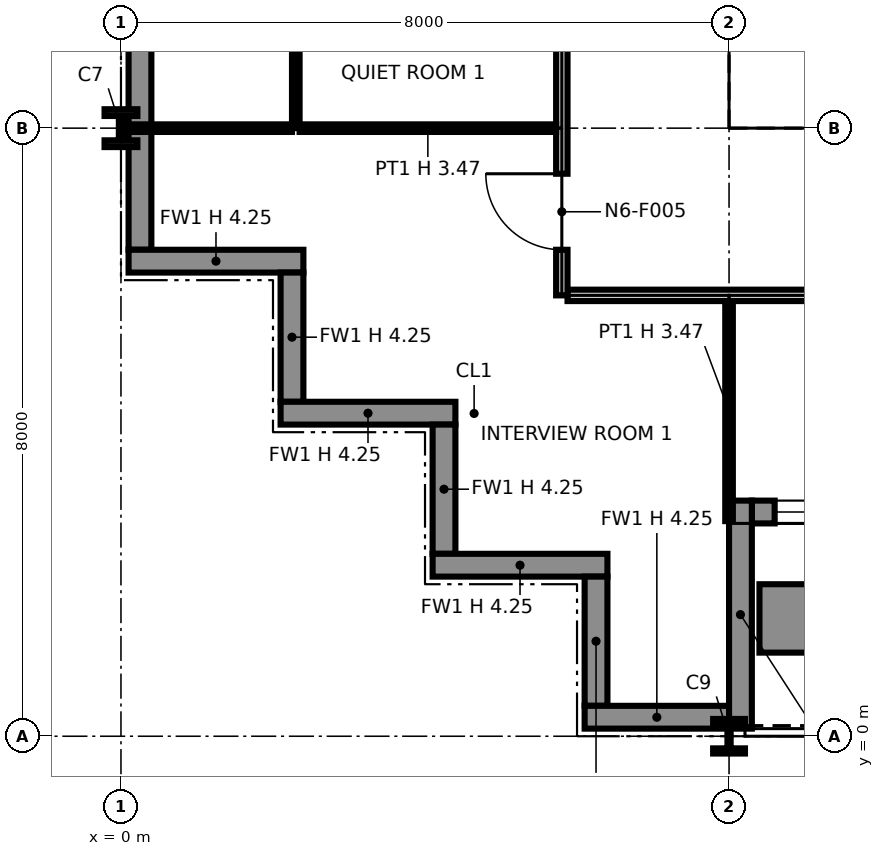
"""IFC4 building model, lengths in metres.
Left out: names, types, materials, properties, quantities, classifications, styles, units other than length and angle.
Written with IfcOpenShell. Run it as: python <this file> out.ifc"""

import sys

from ifc_helpers import new_model, si_unit, direction, frame, frame_2d, origin, origin_2d, place, context, subcontext, project, spatial, polyline, rectangle, i_section, outline, extrude, element, fill, save


model = new_model("IFC4")
c1 = context("Model", 3, precision=1e-05, world=origin(), true_north=direction((0.0, 1.0)))
c2 = subcontext(c1, "Body", "Model", "MODEL_VIEW")
j1 = project(units=[si_unit("LENGTHUNIT", "METRE"), si_unit("PLANEANGLEUNIT", "RADIAN")], contexts=[c1])
p1 = place(None, origin())
s1 = spatial("IfcSite", under=j1, at=p1, CompositionType="ELEMENT")
p2 = place(p1, origin())
s2 = spatial("IfcBuilding", under=s1, at=p2, CompositionType="ELEMENT")
p3 = place(p2, frame((0.0, 0.0, 100.8)))
s3 = spatial("IfcBuildingStorey", under=s2, at=p3, CompositionType="ELEMENT", Elevation=100.8)
p4 = place(p3, frame((0.0, 8.0, 0.0), z_axis=(0.0, 0.0, 1.0), x_axis=(1.0, 0.0, 0.0)))
e1 = element("IfcColumn", 1, at=p4, inside=s3, PredefinedType="COLUMN", context=c2, shape_type="SweptSolid", body=[
    extrude(i_section(OverallWidth=0.432, OverallDepth=0.498, WebThickness=0.056, FlangeThickness=0.089, at=origin_2d()), origin(), (0.0, 0.0, 1.0), 4.25),
])
p5 = place(p3, frame((8.0, 0.0, 0.0), z_axis=(0.0, 0.0, 1.0), x_axis=(1.0, 0.0, 0.0)))
e2 = element("IfcColumn", 2, at=p5, inside=s3, PredefinedType="COLUMN", context=c2, shape_type="SweptSolid", body=[
    extrude(i_section(OverallWidth=0.419, OverallDepth=0.455, WebThickness=0.042, FlangeThickness=0.068, at=origin_2d()), origin(), (0.0, 0.0, 1.0), 4.25),
])
p6 = place(p3, frame((8.0, 8.0, 0.0), z_axis=(0.0, 0.0, 1.0), x_axis=(1.0, 0.0, 0.0)))
e3 = element("IfcColumn", 3, at=p6, inside=s3, PredefinedType="COLUMN", context=c2, shape_type="SweptSolid", body=[
    extrude(i_section(OverallWidth=0.406, OverallDepth=0.417, WebThickness=0.03, FlangeThickness=0.048, at=origin_2d()), origin(), (0.0, 0.0, 1.0), 4.25),
])
p7 = place(p3, frame((0.25, 16.0, 0.0), z_axis=(0.0, 0.0, 1.0), x_axis=(0.0, -1.0, 0.0)))
e4 = element("IfcWall", 4, at=p7, inside=s3, PredefinedType="SOLIDWALL", context=c2, shape_type="SweptSolid", body=[
    extrude(rectangle(XDim=9.6, YDim=0.3, at=frame_2d((4.8, 0.0))), origin(), (0.0, 0.0, 1.0), 4.25),
])
p8 = place(p3, frame((0.1, 6.25, 0.0), z_axis=(0.0, 0.0, 1.0), x_axis=(1.0, 0.0, 0.0)))
e5 = element("IfcWall", 5, at=p8, inside=s3, PredefinedType="SOLIDWALL", context=c2, shape_type="SweptSolid", body=[
    extrude(rectangle(XDim=2.3, YDim=0.3, at=frame_2d((1.15, 0.0))), origin(), (0.0, 0.0, 1.0), 4.25),
])
p9 = place(p3, frame((2.25, 6.1, 0.0), z_axis=(0.0, 0.0, 1.0), x_axis=(0.0, -1.0, 0.0)))
e6 = element("IfcWall", 6, at=p9, inside=s3, PredefinedType="SOLIDWALL", context=c2, shape_type="SweptSolid", body=[
    extrude(rectangle(XDim=1.7, YDim=0.3, at=frame_2d((0.85, 0.0))), origin(), (0.0, 0.0, 1.0), 4.25),
])
p10 = place(p3, frame((2.1, 4.25, 0.0), z_axis=(0.0, 0.0, 1.0), x_axis=(1.0, 0.0, 0.0)))
e7 = element("IfcWall", 7, at=p10, inside=s3, PredefinedType="SOLIDWALL", context=c2, shape_type="SweptSolid", body=[
    extrude(rectangle(XDim=2.3, YDim=0.3, at=frame_2d((1.15, 0.0))), origin(), (0.0, 0.0, 1.0), 4.25),
])
p11 = place(p3, frame((4.25, 4.1, 0.0), z_axis=(0.0, 0.0, 1.0), x_axis=(0.0, -1.0, 0.0)))
e8 = element("IfcWall", 8, at=p11, inside=s3, PredefinedType="SOLIDWALL", context=c2, shape_type="SweptSolid", body=[
    extrude(rectangle(XDim=1.7, YDim=0.3, at=frame_2d((0.85, 0.0))), origin(), (0.0, 0.0, 1.0), 4.25),
])
p12 = place(p3, frame((4.1, 2.25, 0.0), z_axis=(0.0, 0.0, 1.0), x_axis=(1.0, 0.0, 0.0)))
e9 = element("IfcWall", 9, at=p12, inside=s3, PredefinedType="SOLIDWALL", context=c2, shape_type="SweptSolid", body=[
    extrude(rectangle(XDim=2.3, YDim=0.3, at=frame_2d((1.15, 0.0))), origin(), (0.0, 0.0, 1.0), 4.25),
])
p13 = place(p3, frame((6.25, 2.1, 0.0), z_axis=(0.0, 0.0, 1.0), x_axis=(0.0, -1.0, 0.0)))
e10 = element("IfcWall", 10, at=p13, inside=s3, PredefinedType="SOLIDWALL", context=c2, shape_type="SweptSolid", body=[
    extrude(rectangle(XDim=1.7, YDim=0.3, at=frame_2d((0.85, 0.0))), origin(), (0.0, 0.0, 1.0), 4.25),
])
p14 = place(p3, frame((6.1, 0.25, 0.0), z_axis=(0.0, 0.0, 1.0), x_axis=(1.0, 0.0, 0.0)))
e11 = element("IfcWall", 11, at=p14, inside=s3, PredefinedType="SOLIDWALL", context=c2, shape_type="SweptSolid", body=[
    extrude(rectangle(XDim=1.9, YDim=0.3, at=frame_2d((0.95, 0.0))), origin(), (0.0, 0.0, 1.0), 4.25),
])
p15 = place(p3, frame((8.3, 2.95, 0.0), z_axis=(0.0, 0.0, 1.0), x_axis=(1.0, 0.0, 0.0)))
e12 = element("IfcWall", 12, at=p15, inside=s3, PredefinedType="SOLIDWALL", context=c2, shape_type="SweptSolid", body=[
    extrude(rectangle(XDim=7.4, YDim=0.3, at=frame_2d((3.7, 0.0))), origin(), (0.0, 0.0, 1.0), 4.25),
])
p16 = place(p15, frame((0.3, 0.0, 0.9)))
e13 = element("IfcOpeningElement", 13, at=p16, cuts=e12, PredefinedType="OPENING", context=c2, shape_type="SweptSolid", body=[
    extrude(rectangle(XDim=2.8, YDim=2.2, at=frame_2d((1.4, 1.1))), frame((0.0, 0.16, 0.0), z_axis=(0.0, -1.0, 0.0), x_axis=(1.0, 0.0, 0.0)), (0.0, 0.0, 1.0), 0.32),
])
p17 = place(p15, frame((4.7, 0.0, 0.0)))
e14 = element("IfcOpeningElement", 14, at=p17, cuts=e12, PredefinedType="OPENING", context=c2, shape_type="SweptSolid", body=[
    extrude(rectangle(XDim=2.0, YDim=2.4, at=frame_2d((1.0, 1.2))), frame((0.0, 0.16, 0.0), z_axis=(0.0, -1.0, 0.0), x_axis=(1.0, 0.0, 0.0)), (0.0, 0.0, 1.0), 0.32),
])
p18 = place(p3, frame((8.15, 0.1, 0.0), z_axis=(0.0, 0.0, 1.0), x_axis=(0.0, 1.0, 0.0)))
e15 = element("IfcWall", 15, at=p18, inside=s3, PredefinedType="SOLIDWALL", context=c2, shape_type="SweptSolid", body=[
    extrude(rectangle(XDim=3.0, YDim=0.3, at=frame_2d((1.5, 0.0))), origin(), (0.0, 0.0, 1.0), 3.469),
])
p19 = place(p3, frame((8.4, 1.55, 0.0), z_axis=(0.0, 0.0, 1.0), x_axis=(1.0, 0.0, 0.0)))
e16 = element("IfcWall", 16, at=p19, inside=s3, PredefinedType="SOLIDWALL", context=c2, shape_type="SweptSolid", body=[
    extrude(rectangle(XDim=3.2, YDim=0.9, at=frame_2d((1.6, 0.0))), origin(), (0.0, 0.0, 1.0), 0.6),
])
p20 = place(p3, frame((8.65, 8.75, 0.0), z_axis=(0.0, 0.0, 1.0), x_axis=(1.0, 0.0, 0.0)))
e17 = element("IfcWall", 17, at=p20, inside=s3, PredefinedType="PARTITIONING", context=c2, shape_type="SweptSolid", body=[
    extrude(outline(polyline([(0.0, 0.0), (14.7, 0.0), (14.7, 4.25), (7.469, 4.25), (7.469, 3.632), (7.231, 3.632), (7.23, 4.25), (0.0, 4.25), (0.0, 0.0)])), frame((0.0, 0.1, 0.0), z_axis=(0.0, -1.0, 0.0), x_axis=(1.0, 0.0, 0.0)), (0.0, 0.0, 1.0), 0.2),
])
p21 = place(p20, frame((1.3, 0.0, 0.0)))
e18 = element("IfcOpeningElement", 18, at=p21, cuts=e17, PredefinedType="OPENING", context=c2, shape_type="SweptSolid", body=[
    extrude(rectangle(XDim=1.4, YDim=2.1, at=frame_2d((0.7, 1.05))), frame((0.0, 0.11, 0.0), z_axis=(0.0, -1.0, 0.0), x_axis=(1.0, 0.0, 0.0)), (0.0, 0.0, 1.0), 0.22),
])
p22 = place(p20, frame((4.6, 0.0, 0.0)))
e19 = element("IfcOpeningElement", 19, at=p22, cuts=e17, PredefinedType="OPENING", context=c2, shape_type="SweptSolid", body=[
    extrude(rectangle(XDim=1.4, YDim=2.1, at=frame_2d((0.7, 1.05))), frame((0.0, 0.11, 0.0), z_axis=(0.0, -1.0, 0.0), x_axis=(1.0, 0.0, 0.0)), (0.0, 0.0, 1.0), 0.22),
])
p23 = place(p20, frame((10.4, 0.0, 0.0)))
e20 = element("IfcOpeningElement", 20, at=p23, cuts=e17, PredefinedType="OPENING", context=c2, shape_type="SweptSolid", body=[
    extrude(rectangle(XDim=1.2, YDim=2.1, at=frame_2d((0.6, 1.05))), frame((0.0, 0.11, 0.0), z_axis=(0.0, -1.0, 0.0), x_axis=(1.0, 0.0, 0.0)), (0.0, 0.0, 1.0), 0.22),
])
p24 = place(p3, frame((8.75, 8.85, 0.0), z_axis=(0.0, 0.0, 1.0), x_axis=(0.0, 1.0, 0.0)))
e21 = element("IfcWall", 21, at=p24, inside=s3, PredefinedType="PARTITIONING", context=c2, shape_type="SweptSolid", body=[
    extrude(outline(polyline([(0.0, 0.0), (14.3, 0.0), (14.3, 4.25), (10.231, 4.25), (10.23, 3.789), (10.07, 3.789), (10.069, 4.25), (7.27, 4.25), (7.269, 3.632), (7.031, 3.632), (7.031, 4.25), (0.0, 4.25), (0.0, 0.0)])), frame((0.0, 0.1, 0.0), z_axis=(0.0, -1.0, 0.0), x_axis=(1.0, 0.0, 0.0)), (0.0, 0.0, 1.0), 0.2),
])
p25 = place(p24, frame((8.3, 0.0, 0.0)))
e22 = element("IfcOpeningElement", 22, at=p25, cuts=e21, PredefinedType="OPENING", context=c2, shape_type="SweptSolid", body=[
    extrude(rectangle(XDim=1.8, YDim=2.1, at=frame_2d((0.9, 1.05))), frame((0.0, 0.11, 0.0), z_axis=(0.0, -1.0, 0.0), x_axis=(1.0, 0.0, 0.0)), (0.0, 0.0, 1.0), 0.22),
])
p26 = place(p3, frame((8.0, 2.83, 0.0), z_axis=(0.0, 0.0, 1.0), x_axis=(0.0, 1.0, 0.0)))
e23 = element("IfcWall", 23, at=p26, inside=s3, PredefinedType="PARTITIONING", context=c2, shape_type="SweptSolid", body=[
    extrude(rectangle(XDim=2.895, YDim=0.1, at=frame_2d((1.448, 0.0))), origin(), (0.0, 0.0, 1.0), 3.47),
])
p27 = place(p3, frame((5.875, 5.8, 0.0), z_axis=(0.0, 0.0, 1.0), x_axis=(1.0, 0.0, 0.0)))
e24 = element("IfcWall", 24, at=p27, inside=s3, PredefinedType="PARTITIONING", context=c2, shape_type="SweptSolid", body=[
    extrude(rectangle(XDim=20.25, YDim=0.15, at=frame_2d((10.125, 0.0))), origin(), (0.0, 0.0, 1.0), 4.25),
])
p28 = place(p27, frame((14.625, 0.0, 0.0), z_axis=(0.0, 0.0, 1.0), x_axis=(-1.0, 0.0, 0.0)))
e25 = element("IfcOpeningElement", 25, at=p28, cuts=e24, PredefinedType="OPENING", context=c2, shape_type="SweptSolid", body=[
    extrude(rectangle(XDim=1.0, YDim=2.1, at=frame_2d((0.5, 1.05))), frame((0.0, 0.085, 0.0), z_axis=(0.0, -1.0, 0.0), x_axis=(1.0, 0.0, 0.0)), (0.0, 0.0, 1.0), 0.17),
])
p29 = place(p27, frame((4.625, 0.0, 0.0), z_axis=(0.0, 0.0, 1.0), x_axis=(-1.0, 0.0, 0.0)))
e26 = element("IfcOpeningElement", 26, at=p29, cuts=e24, PredefinedType="OPENING", context=c2, shape_type="SweptSolid", body=[
    extrude(rectangle(XDim=1.0, YDim=2.1, at=frame_2d((0.5, 1.05))), frame((0.0, 0.085, 0.0), z_axis=(0.0, -1.0, 0.0), x_axis=(1.0, 0.0, 0.0)), (0.0, 0.0, 1.0), 0.17),
])
p30 = place(p27, frame((8.625, 0.0, 0.0), z_axis=(0.0, 0.0, 1.0), x_axis=(-1.0, 0.0, 0.0)))
e27 = element("IfcOpeningElement", 27, at=p30, cuts=e24, PredefinedType="OPENING", context=c2, shape_type="SweptSolid", body=[
    extrude(rectangle(XDim=1.0, YDim=2.1, at=frame_2d((0.5, 1.05))), frame((0.0, 0.085, 0.0), z_axis=(0.0, -1.0, 0.0), x_axis=(1.0, 0.0, 0.0)), (0.0, 0.0, 1.0), 0.17),
])
p31 = place(p3, frame((5.8, 5.8, 0.0), z_axis=(0.0, 0.0, 1.0), x_axis=(0.0, 1.0, 0.0)))
e28 = element("IfcWall", 28, at=p31, inside=s3, PredefinedType="PARTITIONING", context=c2, shape_type="SweptSolid", body=[
    extrude(outline(polyline([(0.0, 0.0), (20.325, 0.0), (20.325, 4.25), (18.5, 4.25), (18.498, 3.47), (17.902, 3.47), (17.9, 4.25), (14.5, 4.25), (14.498, 3.47), (13.902, 3.47), (13.9, 4.25), (10.5, 4.25), (10.498, 3.47), (9.902, 3.47), (9.9, 4.25), (6.5, 4.25), (6.498, 3.47), (5.902, 3.47), (5.9, 4.25), (2.5, 4.25), (2.498, 3.47), (1.902, 3.47), (1.9, 4.25), (0.0, 4.25), (0.0, 0.0)])), frame((0.0, 0.075, 0.0), z_axis=(0.0, -1.0, 0.0), x_axis=(1.0, 0.0, 0.0)), (0.0, 0.0, 1.0), 0.15),
])
p32 = place(p31, frame((0.6, 0.0, 0.0)))
e29 = element("IfcOpeningElement", 29, at=p32, cuts=e28, PredefinedType="OPENING", context=c2, shape_type="SweptSolid", body=[
    extrude(rectangle(XDim=1.0, YDim=2.1, at=frame_2d((0.5, 1.05))), frame((0.0, 0.085, 0.0), z_axis=(0.0, -1.0, 0.0), x_axis=(1.0, 0.0, 0.0)), (0.0, 0.0, 1.0), 0.17),
])
p33 = place(p31, frame((3.7, 0.0, 0.0)))
e30 = element("IfcOpeningElement", 30, at=p33, cuts=e28, PredefinedType="OPENING", context=c2, shape_type="SweptSolid", body=[
    extrude(rectangle(XDim=1.0, YDim=2.1, at=frame_2d((0.5, 1.05))), frame((0.0, 0.085, 0.0), z_axis=(0.0, -1.0, 0.0), x_axis=(1.0, 0.0, 0.0)), (0.0, 0.0, 1.0), 0.17),
])
p34 = place(p31, frame((7.7, 0.0, 0.0)))
e31 = element("IfcOpeningElement", 31, at=p34, cuts=e28, PredefinedType="OPENING", context=c2, shape_type="SweptSolid", body=[
    extrude(rectangle(XDim=1.0, YDim=2.1, at=frame_2d((0.5, 1.05))), frame((0.0, 0.085, 0.0), z_axis=(0.0, -1.0, 0.0), x_axis=(1.0, 0.0, 0.0)), (0.0, 0.0, 1.0), 0.17),
])
p35 = place(p31, frame((11.425, 0.0, 0.0)))
e32 = element("IfcOpeningElement", 32, at=p35, cuts=e28, PredefinedType="OPENING", context=c2, shape_type="SweptSolid", body=[
    extrude(rectangle(XDim=1.0, YDim=2.1, at=frame_2d((0.5, 1.05))), frame((0.0, 0.085, 0.0), z_axis=(0.0, -1.0, 0.0), x_axis=(1.0, 0.0, 0.0)), (0.0, 0.0, 1.0), 0.17),
])
p36 = place(p31, frame((15.7, 0.0, 0.0)))
e33 = element("IfcOpeningElement", 33, at=p36, cuts=e28, PredefinedType="OPENING", context=c2, shape_type="SweptSolid", body=[
    extrude(rectangle(XDim=1.0, YDim=2.1, at=frame_2d((0.5, 1.05))), frame((0.0, 0.085, 0.0), z_axis=(0.0, -1.0, 0.0), x_axis=(1.0, 0.0, 0.0)), (0.0, 0.0, 1.0), 0.17),
])
p37 = place(p3, frame((0.13, 8.0, 0.0), z_axis=(0.0, 0.0, 1.0), x_axis=(1.0, 0.0, 0.0)))
e34 = element("IfcWall", 34, at=p37, inside=s3, PredefinedType="PARTITIONING", context=c2, shape_type="SweptSolid", body=[
    extrude(rectangle(XDim=2.12, YDim=0.1, at=frame_2d((1.06, 0.0))), origin(), (0.0, 0.0, 1.0), 3.47),
])
p38 = place(p3, frame((2.35, 8.0, 0.0), z_axis=(0.0, 0.0, 1.0), x_axis=(1.0, 0.0, 0.0)))
e35 = element("IfcWall", 35, at=p38, inside=s3, PredefinedType="PARTITIONING", context=c2, shape_type="SweptSolid", body=[
    extrude(rectangle(XDim=3.375, YDim=0.1, at=frame_2d((1.688, 0.0))), origin(), (0.0, 0.0, 1.0), 3.47),
])
p39 = place(p3, frame((2.3, 8.0, 0.0), z_axis=(0.0, 0.0, 1.0), x_axis=(0.0, 1.0, 0.0)))
e36 = element("IfcWall", 36, at=p39, inside=s3, PredefinedType="PARTITIONING", context=c2, shape_type="SweptSolid", body=[
    extrude(rectangle(XDim=3.95, YDim=0.1, at=frame_2d((1.975, 0.0))), origin(), (0.0, 0.0, 1.0), 4.25),
])
p40 = place(p39, frame((1.5, 0.0, 0.0)))
e37 = element("IfcOpeningElement", 37, at=p40, cuts=e36, PredefinedType="OPENING", context=c2, shape_type="SweptSolid", body=[
    extrude(rectangle(XDim=1.0, YDim=2.1, at=frame_2d((0.5, 1.05))), frame((0.0, 0.06, 0.0), z_axis=(0.0, -1.0, 0.0), x_axis=(1.0, 0.0, 0.0)), (0.0, 0.0, 1.0), 0.12),
])
p41 = place(p16, origin())
e38 = element("IfcWindow", 38, at=p41, inside=s3, PartitioningType="SINGLE_PANEL", PredefinedType="WINDOW", context=c2, shape_type="SweptSolid", body=[
    extrude(rectangle(XDim=2.8, YDim=2.2, at=frame_2d((1.4, 1.1))), frame((0.0, 0.03, 0.0), z_axis=(0.0, -1.0, 0.0), x_axis=(1.0, 0.0, 0.0)), (0.0, 0.0, 1.0), 0.06),
])
fill(e13, e38)
p42 = place(p32, origin())
e39 = element("IfcDoor", 39, at=p42, inside=s3, OperationType="SINGLE_SWING_RIGHT", PredefinedType="DOOR", context=c2, shape_type="SweptSolid", body=[
    extrude(rectangle(XDim=1.0, YDim=2.1, at=frame_2d((0.5, 1.05))), frame((0.0, 0.025, 0.0), z_axis=(0.0, -1.0, 0.0), x_axis=(1.0, 0.0, 0.0)), (0.0, 0.0, 1.0), 0.05),
])
fill(e29, e39)
save(model, sys.argv[1])
